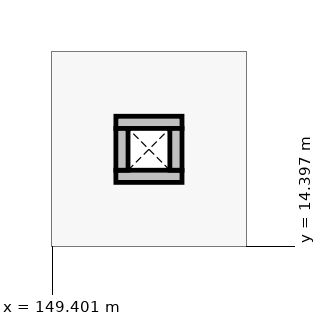
"""IFC4 building model, lengths in metres.
Left out: names, types, materials, properties, quantities, classifications, styles, units other than length and angle.
Written with IfcOpenShell. Run it as: python <this file> out.ifc"""

import sys

from ifc_helpers import new_model, si_unit, direction, frame, frame_2d, origin, place, context, subcontext, project, spatial, rectangle, extrude, element, save


model = new_model("IFC4")
c1 = context("Model", 3, precision=1e-05, world=origin(), true_north=direction((0.0, 1.0)))
c2 = subcontext(c1, "Body", "Model", "MODEL_VIEW")
j1 = project(units=[si_unit("LENGTHUNIT", "METRE"), si_unit("PLANEANGLEUNIT", "RADIAN")], contexts=[c1])
p1 = place(None, origin())
s1 = spatial("IfcSite", under=j1, at=p1, CompositionType="ELEMENT")
p2 = place(p1, origin())
s2 = spatial("IfcBuilding", under=s1, at=p2, CompositionType="ELEMENT")
p3 = place(p2, frame((0.0, 0.0, 8.4)))
s3 = spatial("IfcBuildingStorey", under=s2, at=p3, CompositionType="ELEMENT", Elevation=8.4)
for number, where, z_axis, x_axis in (
    (1, (150.24, 15.32, 0.0), (0.0, 0.0, 1.0), (1.0, 0.0, 0.0)),
    (2, (150.24, 16.03, 0.0), (0.0, 0.0, 1.0), (1.0, 0.0, 0.0)),
):
    element("IfcWall", number, at=place(p3, frame(where, z_axis=z_axis, x_axis=x_axis)), inside=s3, PredefinedType="PARTITIONING", context=c2, shape_type="SweptSolid", body=[
        extrude(rectangle(XDim=0.87, YDim=0.16, at=frame_2d((0.435, 0.0))), origin(), (0.0, 0.0, 1.0), 3.35),
    ])
for number, where, z_axis, x_axis in (
    (3, (150.32, 15.4, 0.0), (0.0, 0.0, 1.0), (0.0, 1.0, 0.0)),
    (4, (151.03, 15.4, 0.0), (0.0, 0.0, 1.0), (0.0, 1.0, 0.0)),
):
    element("IfcWall", number, at=place(p3, frame(where, z_axis=z_axis, x_axis=x_axis)), inside=s3, PredefinedType="PARTITIONING", context=c2, shape_type="SweptSolid", body=[
        extrude(rectangle(XDim=0.55, YDim=0.16, at=frame_2d((0.275, 0.0))), origin(), (0.0, 0.0, 1.0), 3.35),
    ])
save(model, sys.argv[1])
